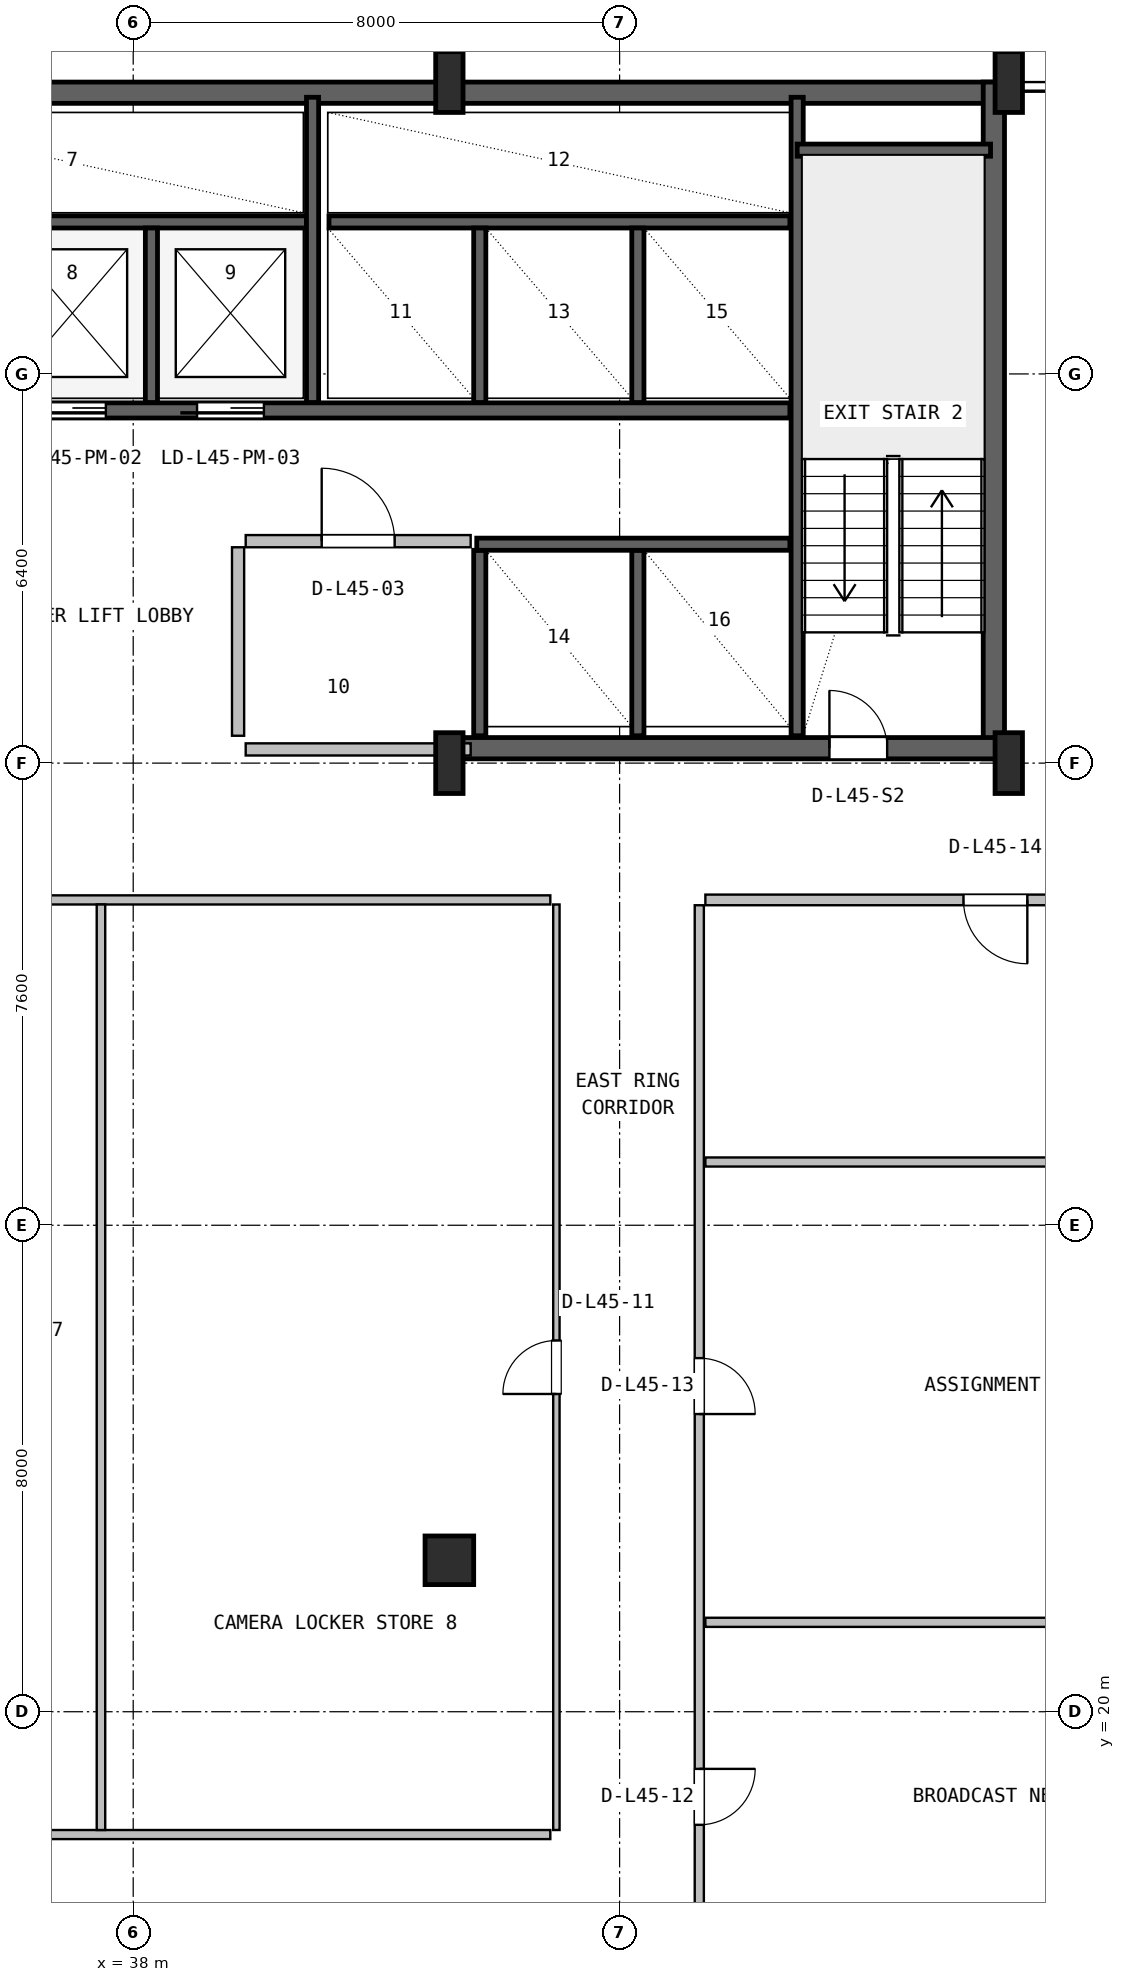
"""IFC4 building model, lengths in metres.
Left out: names, types, materials, properties, quantities, classifications, styles, units other than length and angle.
Written with IfcOpenShell. Run it as: python <this file> out.ifc"""

import sys

from ifc_helpers import new_model, si_unit, direction, frame, frame_2d, origin, origin_2d, place, context, subcontext, project, spatial, rectangle, i_section, extrude, source, transform, mapped, element, fill, save


model = new_model("IFC4")
c1 = context("Model", 3, precision=1e-05, world=origin(), true_north=direction((0.0, 1.0)))
c2 = subcontext(c1, "Body", "Model", "MODEL_VIEW")
j1 = project(units=[si_unit("LENGTHUNIT", "METRE"), si_unit("PLANEANGLEUNIT", "RADIAN")], contexts=[c1])
p1 = place(None, origin())
s1 = spatial("IfcSite", under=j1, at=p1, CompositionType="ELEMENT")
p2 = place(p1, origin())
s2 = spatial("IfcBuilding", under=s1, at=p2, CompositionType="ELEMENT")
p3 = place(p2, frame((0.0, 0.0, 183.8)))
s3 = spatial("IfcBuildingStorey", under=s2, at=p3, CompositionType="ELEMENT", Elevation=183.8)
p4 = place(p3, frame((15.6, 46.625, 0.0), z_axis=(0.0, 0.0, 1.0), x_axis=(1.0, 0.0, 0.0)))
e1 = element("IfcWall", 1, at=p4, inside=s3, PredefinedType="SHEAR", context=c2, shape_type="SweptSolid", body=[
    extrude(rectangle(XDim=36.8, YDim=0.35, at=frame_2d((18.4, 0.0))), origin(), (0.0, 0.0, 1.0), 3.55),
])
p5 = place(p3, frame((52.155, 35.67, 0.0), z_axis=(0.0, 0.0, 1.0), x_axis=(0.0, 1.0, 0.0)))
e2 = element("IfcWall", 2, at=p5, inside=s3, PredefinedType="SHEAR", context=c2, shape_type="SweptSolid", body=[
    extrude(rectangle(XDim=11.13, YDim=0.35, at=frame_2d((5.565, 0.0))), origin(), (0.0, 0.0, 1.0), 3.55),
])
p6 = place(p3, frame((43.2, 35.845, 0.0), z_axis=(0.0, 0.0, 1.0), x_axis=(1.0, 0.0, 0.0)))
e3 = element("IfcWall", 3, at=p6, inside=s3, PredefinedType="SHEAR", context=c2, shape_type="SweptSolid", body=[
    extrude(rectangle(XDim=9.13, YDim=0.35, at=frame_2d((4.565, 0.0))), origin(), (0.0, 0.0, 1.0), 3.55),
])
p7 = place(p6, frame((6.25, 0.0, 0.0)))
e4 = element("IfcOpeningElement", 4, at=p7, cuts=e3, PredefinedType="OPENING", context=c2, shape_type="SweptSolid", body=[
    extrude(rectangle(XDim=0.95, YDim=2.1, at=frame_2d((0.475, 1.05))), frame((0.0, 0.185, 0.0), z_axis=(0.0, -1.0, 0.0), x_axis=(1.0, 0.0, 0.0)), (0.0, 0.0, 1.0), 0.37),
])
m1 = source(origin(), c2, "Body", "SweptSolid", [
    extrude(i_section(OverallWidth=0.45, OverallDepth=1.0, WebThickness=0.016, FlangeThickness=0.03, FilletRadius=0.016, at=origin_2d()), origin(), (0.0, 0.0, 1.0), 3.8),
])
for number, where, z_axis, x_axis in (
    (5, (43.2, 35.6, 0.0), (0.0, 0.0, 1.0), (1.0, 0.0, 0.0)),
    (6, (43.2, 46.8, 0.0), (0.0, 0.0, 1.0), (1.0, 0.0, 0.0)),
    (7, (52.4, 35.6, 0.0), (0.0, 0.0, 1.0), (1.0, 0.0, 0.0)),
    (8, (52.4, 46.8, 0.0), (0.0, 0.0, 1.0), (1.0, 0.0, 0.0)),
):
    element("IfcColumn", number, at=place(p3, frame(where, z_axis=z_axis, x_axis=x_axis)), inside=s3, PredefinedType="COLUMN", context=c2, shape_type="MappedRepresentation", body=[
        mapped(m1, transform((0.0, 0.0, 0.0), x_axis=(1.0, 0.0, 0.0), y_axis=(0.0, 1.0, 0.0), z_axis=(0.0, 0.0, 1.0), scale=1.0)),
    ])
m2 = source(origin(), c2, "Body", "SweptSolid", [
    extrude(rectangle(XDim=0.8, YDim=0.8, at=origin_2d()), origin(), (0.0, 0.0, 1.0), 3.8),
])
p8 = place(p3, frame((43.2, 22.49, 0.0), z_axis=(0.0, 0.0, 1.0), x_axis=(1.0, 0.0, 0.0)))
e9 = element("IfcColumn", 9, at=p8, inside=s3, PredefinedType="COLUMN", context=c2, shape_type="MappedRepresentation", body=[
    mapped(m2, transform((0.0, 0.0, 0.0), x_axis=(1.0, 0.0, 0.0), y_axis=(0.0, 1.0, 0.0), z_axis=(0.0, 0.0, 1.0), scale=1.0)),
])
p9 = place(p3, frame((48.92, 36.05, 0.0), z_axis=(0.0, 0.0, 1.0), x_axis=(0.0, 1.0, 0.0)))
e10 = element("IfcWall", 10, at=p9, inside=s3, PredefinedType="SHEAR", context=c2, shape_type="SweptSolid", body=[
    extrude(rectangle(XDim=10.5, YDim=0.2, at=frame_2d((5.25, 0.0))), origin(), (0.0, 0.0, 1.0), 3.55),
])
p10 = place(p3, frame((48.92, 45.68, 0.0), z_axis=(0.0, 0.0, 1.0), x_axis=(1.0, 0.0, 0.0)))
e11 = element("IfcWall", 11, at=p10, inside=s3, PredefinedType="SHEAR", context=c2, shape_type="SweptSolid", body=[
    extrude(rectangle(XDim=3.18, YDim=0.2, at=frame_2d((1.59, 0.0))), origin(), (0.0, 0.0, 1.0), 3.55),
])
p11 = place(p3, frame((24.98, 41.4, 0.0), z_axis=(0.0, 0.0, 1.0), x_axis=(1.0, 0.0, 0.0)))
e12 = element("IfcWall", 12, at=p11, inside=s3, PredefinedType="SHEAR", context=c2, shape_type="SweptSolid", body=[
    extrude(rectangle(XDim=23.82, YDim=0.25, at=frame_2d((11.91, 0.0))), origin(), (0.0, 0.0, 1.0), 3.55),
])
p12 = place(p11, frame((8.87, 0.0, 0.0)))
e13 = element("IfcOpeningElement", 13, at=p12, cuts=e12, PredefinedType="OPENING", context=c2, shape_type="SweptSolid", body=[
    extrude(rectangle(XDim=1.1, YDim=2.18, at=frame_2d((0.55, 1.09))), frame((0.0, 0.135, 0.0), z_axis=(0.0, -1.0, 0.0), x_axis=(1.0, 0.0, 0.0)), (0.0, 0.0, 1.0), 0.27),
])
p13 = place(p11, frame((11.47, 0.0, 0.0)))
e14 = element("IfcOpeningElement", 14, at=p13, cuts=e12, PredefinedType="OPENING", context=c2, shape_type="SweptSolid", body=[
    extrude(rectangle(XDim=1.1, YDim=2.18, at=frame_2d((0.55, 1.09))), frame((0.0, 0.135, 0.0), z_axis=(0.0, -1.0, 0.0), x_axis=(1.0, 0.0, 0.0)), (0.0, 0.0, 1.0), 0.27),
])
p14 = place(p11, frame((14.07, 0.0, 0.0)))
e15 = element("IfcOpeningElement", 15, at=p14, cuts=e12, PredefinedType="OPENING", context=c2, shape_type="SweptSolid", body=[
    extrude(rectangle(XDim=1.1, YDim=2.18, at=frame_2d((0.55, 1.09))), frame((0.0, 0.135, 0.0), z_axis=(0.0, -1.0, 0.0), x_axis=(1.0, 0.0, 0.0)), (0.0, 0.0, 1.0), 0.27),
])
p15 = place(p11, frame((3.56, 0.0, 0.0)))
e16 = element("IfcOpeningElement", 16, at=p15, cuts=e12, PredefinedType="OPENING", context=c2, shape_type="SweptSolid", body=[
    extrude(rectangle(XDim=1.0, YDim=2.08, at=frame_2d((0.5, 1.04))), frame((0.0, 0.135, 0.0), z_axis=(0.0, -1.0, 0.0), x_axis=(1.0, 0.0, 0.0)), (0.0, 0.0, 1.0), 0.27),
])
p16 = place(p3, frame((33.22, 44.5, 0.0), z_axis=(0.0, 0.0, 1.0), x_axis=(1.0, 0.0, 0.0)))
e17 = element("IfcWall", 17, at=p16, inside=s3, PredefinedType="SHEAR", context=c2, shape_type="SweptSolid", body=[
    extrude(rectangle(XDim=7.63, YDim=0.2, at=frame_2d((3.815, 0.0))), origin(), (0.0, 0.0, 1.0), 3.55),
])
p17 = place(p3, frame((38.3, 41.53, 0.0), z_axis=(0.0, 0.0, 1.0), x_axis=(0.0, 1.0, 0.0)))
e18 = element("IfcWall", 18, at=p17, inside=s3, PredefinedType="SHEAR", context=c2, shape_type="SweptSolid", body=[
    extrude(rectangle(XDim=2.87, YDim=0.2, at=frame_2d((1.435, 0.0))), origin(), (0.0, 0.0, 1.0), 3.55),
])
p18 = place(p3, frame((40.95, 41.53, 0.0), z_axis=(0.0, 0.0, 1.0), x_axis=(0.0, 1.0, 0.0)))
e19 = element("IfcWall", 19, at=p18, inside=s3, PredefinedType="SHEAR", context=c2, shape_type="SweptSolid", body=[
    extrude(rectangle(XDim=5.02, YDim=0.2, at=frame_2d((2.51, 0.0))), origin(), (0.0, 0.0, 1.0), 3.55),
])
p19 = place(p3, frame((41.22, 44.5, 0.0), z_axis=(0.0, 0.0, 1.0), x_axis=(1.0, 0.0, 0.0)))
e20 = element("IfcWall", 20, at=p19, inside=s3, PredefinedType="SHEAR", context=c2, shape_type="SweptSolid", body=[
    extrude(rectangle(XDim=7.58, YDim=0.2, at=frame_2d((3.79, 0.0))), origin(), (0.0, 0.0, 1.0), 3.55),
])
for number, where, z_axis, x_axis in (
    (21, (43.7, 41.53, 0.0), (0.0, 0.0, 1.0), (0.0, 1.0, 0.0)),
    (22, (46.3, 41.53, 0.0), (0.0, 0.0, 1.0), (0.0, 1.0, 0.0)),
):
    element("IfcWall", number, at=place(p3, frame(where, z_axis=z_axis, x_axis=x_axis)), inside=s3, PredefinedType="SHEAR", context=c2, shape_type="SweptSolid", body=[
        extrude(rectangle(XDim=2.87, YDim=0.2, at=frame_2d((1.435, 0.0))), origin(), (0.0, 0.0, 1.0), 3.55),
    ])
for number, where, z_axis, x_axis in (
    (23, (43.7, 36.05, 0.0), (0.0, 0.0, 1.0), (0.0, 1.0, 0.0)),
    (24, (46.3, 36.05, 0.0), (0.0, 0.0, 1.0), (0.0, 1.0, 0.0)),
):
    element("IfcWall", number, at=place(p3, frame(where, z_axis=z_axis, x_axis=x_axis)), inside=s3, PredefinedType="SHEAR", context=c2, shape_type="SweptSolid", body=[
        extrude(rectangle(XDim=3.05, YDim=0.2, at=frame_2d((1.525, 0.0))), origin(), (0.0, 0.0, 1.0), 3.55),
    ])
p20 = place(p3, frame((43.65, 39.2, 0.0), z_axis=(0.0, 0.0, 1.0), x_axis=(1.0, 0.0, 0.0)))
e25 = element("IfcWall", 25, at=p20, inside=s3, PredefinedType="SHEAR", context=c2, shape_type="SweptSolid", body=[
    extrude(rectangle(XDim=5.15, YDim=0.2, at=frame_2d((2.575, 0.0))), origin(), (0.0, 0.0, 1.0), 3.55),
])
p21 = place(p3, frame((39.85, 35.825, 0.0), z_axis=(0.0, 0.0, 1.0), x_axis=(1.0, 0.0, 0.0)))
e26 = element("IfcWall", 26, at=p21, inside=s3, PredefinedType="SOLIDWALL", context=c2, shape_type="SweptSolid", body=[
    extrude(rectangle(XDim=3.7, YDim=0.2, at=frame_2d((1.85, 0.0))), origin(), (0.0, 0.0, 1.0), 2.575),
])
p22 = place(p3, frame((39.85, 39.25, 0.0), z_axis=(0.0, 0.0, 1.0), x_axis=(1.0, 0.0, 0.0)))
e27 = element("IfcWall", 27, at=p22, inside=s3, PredefinedType="SOLIDWALL", context=c2, shape_type="SweptSolid", body=[
    extrude(rectangle(XDim=3.7, YDim=0.2, at=frame_2d((1.85, 0.0))), origin(), (0.0, 0.0, 1.0), 3.53),
])
p23 = place(p22, frame((1.25, 0.0, 0.0)))
e28 = element("IfcOpeningElement", 28, at=p23, cuts=e27, PredefinedType="OPENING", context=c2, shape_type="SweptSolid", body=[
    extrude(rectangle(XDim=1.2, YDim=2.1, at=frame_2d((0.6, 1.05))), frame((0.0, 0.11, 0.0), z_axis=(0.0, -1.0, 0.0), x_axis=(1.0, 0.0, 0.0)), (0.0, 0.0, 1.0), 0.22),
])
p24 = place(p3, frame((39.725, 36.05, 0.0), z_axis=(0.0, 0.0, 1.0), x_axis=(0.0, 1.0, 0.0)))
e29 = element("IfcWall", 29, at=p24, inside=s3, PredefinedType="SOLIDWALL", context=c2, shape_type="SweptSolid", body=[
    extrude(rectangle(XDim=3.1, YDim=0.2, at=frame_2d((1.55, 0.0))), origin(), (0.0, 0.0, 1.0), 3.53),
])
p25 = place(p3, frame((22.97, 17.98, 0.0), z_axis=(0.0, 0.0, 1.0), x_axis=(1.0, 0.0, 0.0)))
e30 = element("IfcWall", 30, at=p25, inside=s3, PredefinedType="PARTITIONING", context=c2, shape_type="SweptSolid", body=[
    extrude(rectangle(XDim=21.89, YDim=0.15, at=frame_2d((10.945, 0.0))), origin(), (0.0, 0.0, 1.0), 2.909),
])
p26 = place(p25, frame((11.455, 0.0, 0.0)))
e31 = element("IfcOpeningElement", 31, at=p26, cuts=e30, PredefinedType="OPENING", context=c2, shape_type="SweptSolid", body=[
    extrude(rectangle(XDim=1.0, YDim=2.1, at=frame_2d((0.5, 1.05))), frame((0.0, 0.085, 0.0), z_axis=(0.0, -1.0, 0.0), x_axis=(1.0, 0.0, 0.0)), (0.0, 0.0, 1.0), 0.17),
])
p27 = place(p3, frame((22.97, 33.35, 0.0), z_axis=(0.0, 0.0, 1.0), x_axis=(1.0, 0.0, 0.0)))
e32 = element("IfcWall", 32, at=p27, inside=s3, PredefinedType="PARTITIONING", context=c2, shape_type="SweptSolid", body=[
    extrude(rectangle(XDim=21.89, YDim=0.15, at=frame_2d((10.945, 0.0))), origin(), (0.0, 0.0, 1.0), 2.909),
])
p28 = place(p3, frame((37.47, 18.055, 0.0), z_axis=(0.0, 0.0, 1.0), x_axis=(0.0, 1.0, 0.0)))
e33 = element("IfcWall", 33, at=p28, inside=s3, PredefinedType="PARTITIONING", context=c2, shape_type="SweptSolid", body=[
    extrude(rectangle(XDim=15.22, YDim=0.14, at=frame_2d((7.61, 0.0))), origin(), (0.0, 0.0, 1.0), 2.909),
])
p29 = place(p3, frame((44.96, 18.055, 0.0), z_axis=(0.0, 0.0, 1.0), x_axis=(0.0, 1.0, 0.0)))
e34 = element("IfcWall", 34, at=p29, inside=s3, PredefinedType="PARTITIONING", context=c2, shape_type="SweptSolid", body=[
    extrude(rectangle(XDim=15.22, YDim=0.105, at=frame_2d((7.61, 0.0))), origin(), (0.0, 0.0, 1.0), 3.222),
])
p30 = place(p29, frame((7.17, 0.0, 0.0)))
e35 = element("IfcOpeningElement", 35, at=p30, cuts=e34, PredefinedType="OPENING", context=c2, shape_type="SweptSolid", body=[
    extrude(rectangle(XDim=0.88, YDim=2.06, at=frame_2d((0.44, 1.03))), frame((0.0, 0.062, 0.0), z_axis=(0.0, -1.0, 0.0), x_axis=(1.0, 0.0, 0.0)), (0.0, 0.0, 1.0), 0.125),
])
p31 = place(p3, frame((47.41, 21.47, 0.0), z_axis=(0.0, 0.0, 1.0), x_axis=(1.0, 0.0, 0.0)))
e36 = element("IfcWall", 36, at=p31, inside=s3, PredefinedType="PARTITIONING", context=c2, shape_type="SweptSolid", body=[
    extrude(rectangle(XDim=13.41, YDim=0.15, at=frame_2d((6.705, 0.0))), origin(), (0.0, 0.0, 1.0), 3.108),
])
p32 = place(p3, frame((47.31, 15.7, 0.0), z_axis=(0.0, 0.0, 1.0), x_axis=(0.0, 1.0, 0.0)))
e37 = element("IfcWall", 37, at=p32, inside=s3, PredefinedType="PARTITIONING", context=c2, shape_type="SweptSolid", body=[
    extrude(rectangle(XDim=17.563, YDim=0.15, at=frame_2d((8.781, 0.0))), origin(), (0.0, 0.0, 1.0), 3.222),
])
p33 = place(p32, frame((2.44, 0.0, 0.0)))
e38 = element("IfcOpeningElement", 38, at=p33, cuts=e37, PredefinedType="OPENING", context=c2, shape_type="SweptSolid", body=[
    extrude(rectangle(XDim=0.92, YDim=2.08, at=frame_2d((0.46, 1.04))), frame((0.0, 0.085, 0.0), z_axis=(0.0, -1.0, 0.0), x_axis=(1.0, 0.0, 0.0)), (0.0, 0.0, 1.0), 0.17),
])
p34 = place(p32, frame((9.195, 0.0, 0.0)))
e39 = element("IfcOpeningElement", 39, at=p34, cuts=e37, PredefinedType="OPENING", context=c2, shape_type="SweptSolid", body=[
    extrude(rectangle(XDim=0.92, YDim=2.08, at=frame_2d((0.46, 1.04))), frame((0.0, 0.085, 0.0), z_axis=(0.0, -1.0, 0.0), x_axis=(1.0, 0.0, 0.0)), (0.0, 0.0, 1.0), 0.17),
])
p35 = place(p3, frame((47.41, 29.04, 0.0), z_axis=(0.0, 0.0, 1.0), x_axis=(1.0, 0.0, 0.0)))
e40 = element("IfcWall", 40, at=p35, inside=s3, PredefinedType="PARTITIONING", context=c2, shape_type="SweptSolid", body=[
    extrude(rectangle(XDim=13.41, YDim=0.15, at=frame_2d((6.705, 0.0))), origin(), (0.0, 0.0, 1.0), 3.108),
])
p36 = place(p3, frame((47.41, 33.35, 0.0), z_axis=(0.0, 0.0, 1.0), x_axis=(1.0, 0.0, 0.0)))
e41 = element("IfcWall", 41, at=p36, inside=s3, PredefinedType="PARTITIONING", context=c2, shape_type="SweptSolid", body=[
    extrude(rectangle(XDim=13.41, YDim=0.175, at=frame_2d((6.705, 0.0))), origin(), (0.0, 0.0, 1.0), 3.108),
])
p37 = place(p36, frame((4.245, 0.0, 0.0)))
e42 = element("IfcOpeningElement", 42, at=p37, cuts=e41, PredefinedType="OPENING", context=c2, shape_type="SweptSolid", body=[
    extrude(rectangle(XDim=1.05, YDim=2.1, at=frame_2d((0.525, 1.05))), frame((0.0, 0.098, 0.0), z_axis=(0.0, -1.0, 0.0), x_axis=(1.0, 0.0, 0.0)), (0.0, 0.0, 1.0), 0.195),
])
m3 = source(origin(), c2, "Body", "SweptSolid", [
    extrude(rectangle(XDim=0.95, YDim=2.1, at=frame_2d((0.475, 1.05))), frame((0.0, 0.025, 0.0), z_axis=(0.0, -1.0, 0.0), x_axis=(1.0, 0.0, 0.0)), (0.0, 0.0, 1.0), 0.05),
])
p38 = place(p7, origin())
e43 = element("IfcDoor", 43, at=p38, inside=s3, OperationType="SINGLE_SWING_LEFT", PredefinedType="DOOR", context=c2, shape_type="MappedRepresentation", body=[
    mapped(m3, transform((0.0, 0.0, 0.0), x_axis=(1.0, 0.0, 0.0), y_axis=(0.0, 1.0, 0.0), z_axis=(0.0, 0.0, 1.0), scale=1.0)),
])
fill(e4, e43)
m4 = source(origin(), c2, "Body", "SweptSolid", [
    extrude(rectangle(XDim=1.1, YDim=2.18, at=frame_2d((0.55, 1.09))), frame((0.0, 0.025, 0.0), z_axis=(0.0, -1.0, 0.0), x_axis=(1.0, 0.0, 0.0)), (0.0, 0.0, 1.0), 0.05),
])
p39 = place(p13, frame((1.1, 0.0, 0.0), z_axis=(0.0, 0.0, 1.0), x_axis=(-1.0, 0.0, 0.0)))
e44 = element("IfcDoor", 44, at=p39, inside=s3, OperationType="SLIDING_TO_LEFT", PredefinedType="DOOR", context=c2, shape_type="MappedRepresentation", body=[
    mapped(m4, transform((0.0, 0.0, 0.0), x_axis=(1.0, 0.0, 0.0), y_axis=(0.0, 1.0, 0.0), z_axis=(0.0, 0.0, 1.0), scale=1.0)),
])
fill(e14, e44)
p40 = place(p14, frame((1.1, 0.0, 0.0), z_axis=(0.0, 0.0, 1.0), x_axis=(-1.0, 0.0, 0.0)))
e45 = element("IfcDoor", 45, at=p40, inside=s3, OperationType="SLIDING_TO_LEFT", PredefinedType="DOOR", context=c2, shape_type="MappedRepresentation", body=[
    mapped(m4, transform((0.0, 0.0, 0.0), x_axis=(1.0, 0.0, 0.0), y_axis=(0.0, 1.0, 0.0), z_axis=(0.0, 0.0, 1.0), scale=1.0)),
])
fill(e15, e45)
m5 = source(origin(), c2, "Body", "SweptSolid", [
    extrude(rectangle(XDim=1.2, YDim=2.1, at=frame_2d((0.6, 1.05))), frame((0.0, 0.025, 0.0), z_axis=(0.0, -1.0, 0.0), x_axis=(1.0, 0.0, 0.0)), (0.0, 0.0, 1.0), 0.05),
])
p41 = place(p23, origin())
e46 = element("IfcDoor", 46, at=p41, inside=s3, OperationType="SINGLE_SWING_LEFT", PredefinedType="DOOR", context=c2, shape_type="MappedRepresentation", body=[
    mapped(m5, transform((0.0, 0.0, 0.0), x_axis=(1.0, 0.0, 0.0), y_axis=(0.0, 1.0, 0.0), z_axis=(0.0, 0.0, 1.0), scale=1.0)),
])
fill(e28, e46)
m6 = source(origin(), c2, "Body", "SweptSolid", [
    extrude(rectangle(XDim=0.88, YDim=2.06, at=frame_2d((0.44, 1.03))), frame((0.0, 0.025, 0.0), z_axis=(0.0, -1.0, 0.0), x_axis=(1.0, 0.0, 0.0)), (0.0, 0.0, 1.0), 0.05),
])
p42 = place(p30, origin())
e47 = element("IfcDoor", 47, at=p42, inside=s3, OperationType="SINGLE_SWING_LEFT", PredefinedType="DOOR", context=c2, shape_type="MappedRepresentation", body=[
    mapped(m6, transform((0.0, 0.0, 0.0), x_axis=(1.0, 0.0, 0.0), y_axis=(0.0, 1.0, 0.0), z_axis=(0.0, 0.0, 1.0), scale=1.0)),
])
fill(e35, e47)
m7 = source(origin(), c2, "Body", "SweptSolid", [
    extrude(rectangle(XDim=0.92, YDim=2.08, at=frame_2d((0.46, 1.04))), frame((0.0, 0.025, 0.0), z_axis=(0.0, -1.0, 0.0), x_axis=(1.0, 0.0, 0.0)), (0.0, 0.0, 1.0), 0.05),
])
p43 = place(p33, frame((0.92, 0.0, 0.0), z_axis=(0.0, 0.0, 1.0), x_axis=(-1.0, 0.0, 0.0)))
e48 = element("IfcDoor", 48, at=p43, inside=s3, OperationType="SINGLE_SWING_RIGHT", PredefinedType="DOOR", context=c2, shape_type="MappedRepresentation", body=[
    mapped(m7, transform((0.0, 0.0, 0.0), x_axis=(1.0, 0.0, 0.0), y_axis=(0.0, 1.0, 0.0), z_axis=(0.0, 0.0, 1.0), scale=1.0)),
])
fill(e38, e48)
p44 = place(p34, frame((0.92, 0.0, 0.0), z_axis=(0.0, 0.0, 1.0), x_axis=(-1.0, 0.0, 0.0)))
e49 = element("IfcDoor", 49, at=p44, inside=s3, OperationType="SINGLE_SWING_LEFT", PredefinedType="DOOR", context=c2, shape_type="MappedRepresentation", body=[
    mapped(m7, transform((0.0, 0.0, 0.0), x_axis=(1.0, 0.0, 0.0), y_axis=(0.0, 1.0, 0.0), z_axis=(0.0, 0.0, 1.0), scale=1.0)),
])
fill(e39, e49)
m8 = source(origin(), c2, "Body", "SweptSolid", [
    extrude(rectangle(XDim=1.05, YDim=2.1, at=frame_2d((0.525, 1.05))), frame((0.0, 0.025, 0.0), z_axis=(0.0, -1.0, 0.0), x_axis=(1.0, 0.0, 0.0)), (0.0, 0.0, 1.0), 0.05),
])
p45 = place(p37, frame((1.05, 0.0, 0.0), z_axis=(0.0, 0.0, 1.0), x_axis=(-1.0, 0.0, 0.0)))
e50 = element("IfcDoor", 50, at=p45, inside=s3, OperationType="SINGLE_SWING_RIGHT", PredefinedType="DOOR", context=c2, shape_type="MappedRepresentation", body=[
    mapped(m8, transform((0.0, 0.0, 0.0), x_axis=(1.0, 0.0, 0.0), y_axis=(0.0, 1.0, 0.0), z_axis=(0.0, 0.0, 1.0), scale=1.0)),
])
fill(e42, e50)
save(model, sys.argv[1])
